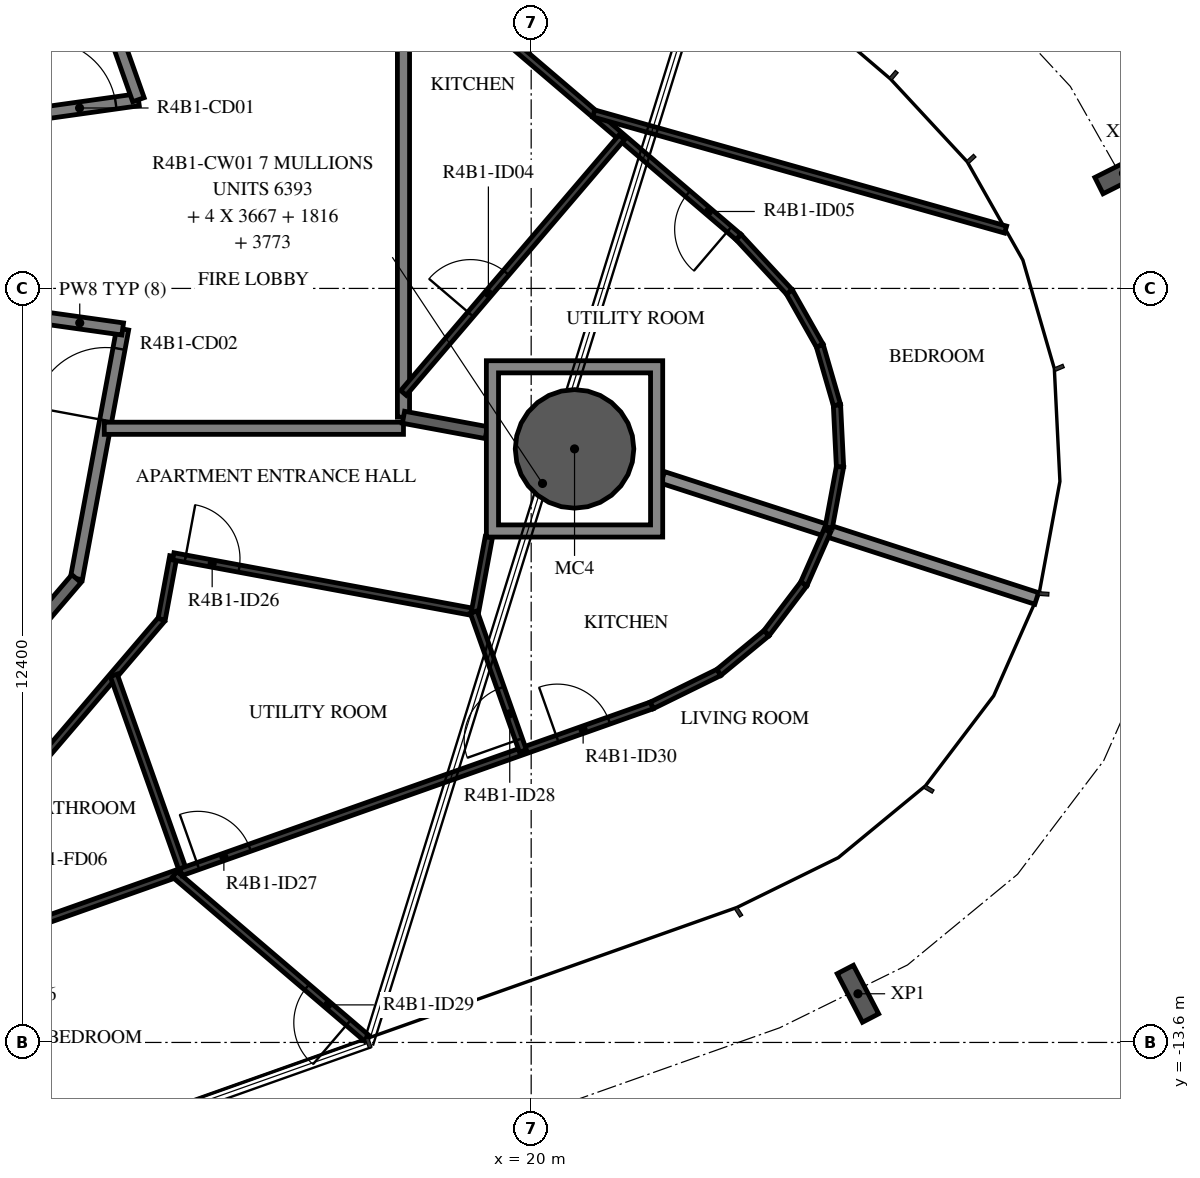
"""IFC4 building model, lengths in metres.
Left out: names, types, materials, properties, quantities, classifications, styles, units other than length and angle.
Written with IfcOpenShell. Run it as: python <this file> out.ifc"""

import sys

from ifc_helpers import new_model, si_unit, direction, frame, frame_2d, origin, origin_2d, place, context, subcontext, project, spatial, polyline, rectangle, hollow_circle, i_section, outline, extrude, element, fill, save


model = new_model("IFC4")
c1 = context("Model", 3, precision=1e-05, world=origin(), true_north=direction((0.0, 1.0)))
c2 = subcontext(c1, "Body", "Model", "MODEL_VIEW")
j1 = project(units=[si_unit("LENGTHUNIT", "METRE"), si_unit("PLANEANGLEUNIT", "RADIAN")], contexts=[c1])
p1 = place(None, origin())
s1 = spatial("IfcSite", under=j1, at=p1, CompositionType="ELEMENT")
p2 = place(p1, origin())
s2 = spatial("IfcBuilding", under=s1, at=p2, CompositionType="ELEMENT")
p3 = place(p2, frame((0.0, 0.0, 162.2)))
s3 = spatial("IfcBuildingStorey", under=s2, at=p3, CompositionType="ELEMENT", Elevation=162.2)
p4 = place(p3, frame((20.713, -3.839, -0.38), z_axis=(0.0, 0.0, 1.0), x_axis=(1.0, 0.0, 0.0)))
e1 = element("IfcColumn", 1, at=p4, inside=s3, PredefinedType="COLUMN", context=c2, shape_type="SweptSolid", body=[
    extrude(hollow_circle(Radius=0.975, WallThickness=0.045, at=origin_2d()), origin(), (0.0, 0.0, 1.0), 3.5),
])
for number, where, z_axis, x_axis in (
    (2, (25.374, -12.799, -0.38), (0.0, 0.0, 1.0), (-0.887, -0.461, 0.0)),
    (3, (29.74, 0.692, -0.38), (0.0, 0.0, 1.0), (0.449, -0.894, 0.0)),
):
    element("IfcColumn", number, at=place(p3, frame(where, z_axis=z_axis, x_axis=x_axis)), inside=s3, PredefinedType="COLUMN", context=c2, shape_type="SweptSolid", body=[
        extrude(i_section(OverallWidth=0.3, OverallDepth=0.9, WebThickness=0.019, FlangeThickness=0.035, FilletRadius=0.03, at=origin_2d()), origin(), (0.0, 0.0, 1.0), 3.5),
    ])
p5 = place(p3, frame((11.87, 1.668, 0.0), z_axis=(0.0, 0.0, 1.0), x_axis=(0.990270910415, 0.139152879904, 0.0)))
e4 = element("IfcWall", 4, at=p5, inside=s3, PredefinedType="STANDARD", context=c2, shape_type="SweptSolid", body=[
    extrude(rectangle(XDim=1.688, YDim=0.2, at=frame_2d((0.844, 0.0))), origin(), (0.0, 0.0, 1.0), 3.12),
])
p6 = place(p5, frame((0.11, 0.0, 0.0)))
e5 = element("IfcOpeningElement", 5, at=p6, cuts=e4, PredefinedType="OPENING", context=c2, shape_type="SweptSolid", body=[
    extrude(rectangle(XDim=1.2, YDim=2.1, at=frame_2d((0.6, 1.05))), frame((0.0, 0.11, 0.0), z_axis=(0.0, -1.0, 0.0), x_axis=(1.0, 0.0, 0.0)), (0.0, 0.0, 1.0), 0.22),
])
p7 = place(p3, frame((13.542, 1.903, 0.0), z_axis=(0.0, 0.0, 1.0), x_axis=(-0.333808508206, 0.942640907159, 0.0)))
e6 = element("IfcWall", 6, at=p7, inside=s3, PredefinedType="STANDARD", context=c2, shape_type="SweptSolid", body=[
    extrude(rectangle(XDim=6.317, YDim=0.2, at=frame_2d((3.158, 0.0))), origin(), (0.0, 0.0, 1.0), 3.12),
])
p8 = place(p3, frame((12.521, -5.972, 0.0), z_axis=(0.0, 0.0, 1.0), x_axis=(0.182244189886, 0.983253301674, 0.0)))
e7 = element("IfcWall", 7, at=p8, inside=s3, PredefinedType="STANDARD", context=c2, shape_type="SweptSolid", body=[
    extrude(rectangle(XDim=4.176, YDim=0.2, at=frame_2d((2.088, 0.0))), origin(), (0.0, 0.0, 1.0), 3.12),
])
p9 = place(p8, frame((2.645, 0.0, 0.0)))
e8 = element("IfcOpeningElement", 8, at=p9, cuts=e7, PredefinedType="OPENING", context=c2, shape_type="SweptSolid", body=[
    extrude(rectangle(XDim=1.2, YDim=2.1, at=frame_2d((0.6, 1.05))), frame((0.0, 0.11, 0.0), z_axis=(0.0, -1.0, 0.0), x_axis=(1.0, 0.0, 0.0)), (0.0, 0.0, 1.0), 0.22),
])
p10 = place(p3, frame((13.282, -1.867, 0.0), z_axis=(0.0, 0.0, 1.0), x_axis=(-0.990265430288, 0.139191873241, 0.0)))
e9 = element("IfcWall", 9, at=p10, inside=s3, PredefinedType="STANDARD", context=c2, shape_type="SweptSolid", body=[
    extrude(rectangle(XDim=1.426, YDim=0.2, at=frame_2d((0.713, 0.0))), origin(), (0.0, 0.0, 1.0), 3.12),
])
p11 = place(p3, frame((7.858, -11.433, 0.0), z_axis=(0.0, 0.0, 1.0), x_axis=(0.649440801937, 0.760412154545, 0.0)))
e10 = element("IfcWall", 10, at=p11, inside=s3, PredefinedType="STANDARD", context=c2, shape_type="SweptSolid", body=[
    extrude(rectangle(XDim=7.181, YDim=0.2, at=frame_2d((3.59, 0.0))), origin(), (0.0, 0.0, 1.0), 3.12),
])
p12 = place(p11, frame((0.592, 0.0, 0.0)))
e11 = element("IfcOpeningElement", 11, at=p12, cuts=e10, PredefinedType="OPENING", context=c2, shape_type="SweptSolid", body=[
    extrude(rectangle(XDim=1.0, YDim=2.1, at=frame_2d((0.5, 1.05))), frame((0.0, 0.11, 0.0), z_axis=(0.0, -1.0, 0.0), x_axis=(1.0, 0.0, 0.0)), (0.0, 0.0, 1.0), 0.22),
])
p13 = place(p3, frame((17.9, -3.318, 0.0), z_axis=(0.0, 0.0, 1.0), x_axis=(0.0, 1.0, 0.0)))
e12 = element("IfcWall", 12, at=p13, inside=s3, PredefinedType="STANDARD", context=c2, shape_type="SweptSolid", body=[
    extrude(rectangle(XDim=6.818, YDim=0.2, at=frame_2d((3.409, 0.0))), origin(), (0.0, 0.0, 1.0), 3.12),
])
p14 = place(p3, frame((12.979, -3.5, 0.0), z_axis=(0.0, 0.0, 1.0), x_axis=(1.0, 0.0, 0.0)))
e13 = element("IfcWall", 13, at=p14, inside=s3, PredefinedType="STANDARD", context=c2, shape_type="SweptSolid", body=[
    extrude(rectangle(XDim=4.92, YDim=0.2, at=frame_2d((2.46, 0.0))), origin(), (0.0, 0.0, 1.0), 3.12),
])
p15 = place(p3, frame((17.9, -3.319, 0.0), z_axis=(0.0, 0.0, 1.0), x_axis=(0.983246950753, -0.182278451375, 0.0)))
e14 = element("IfcWall", 14, at=p15, inside=s3, PredefinedType="STANDARD", context=c2, shape_type="SweptSolid", body=[
    extrude(rectangle(XDim=1.386, YDim=0.2, at=frame_2d((0.693, 0.0))), origin(), (0.0, 0.0, 1.0), 3.12),
])
p16 = place(p3, frame((22.163, -4.308, 0.0), z_axis=(0.0, 0.0, 1.0), x_axis=(0.951422718769, -0.307887658426, 0.0)))
e15 = element("IfcWall", 15, at=p16, inside=s3, PredefinedType="STANDARD", context=c2, shape_type="SweptSolid", body=[
    extrude(rectangle(XDim=6.464, YDim=0.2, at=frame_2d((3.232, 0.0))), origin(), (0.0, 0.0, 1.0), 2.73),
])
p17 = place(p3, frame((23.411, -0.357, 0.0), z_axis=(0.0, 0.0, 1.0), x_axis=(-0.76041871148, 0.649433124525, 0.0)))
e16 = element("IfcWall", 16, at=p17, inside=s3, PredefinedType="PARTITIONING", context=c2, shape_type="SweptSolid", body=[
    extrude(rectangle(XDim=9.259, YDim=0.12, at=frame_2d((4.629, 0.0))), origin(), (0.0, 0.0, 1.0), 3.12),
])
p18 = place(p17, frame((6.972, 0.0, 0.0)))
e17 = element("IfcOpeningElement", 17, at=p18, cuts=e16, PredefinedType="OPENING", context=c2, shape_type="SweptSolid", body=[
    extrude(rectangle(XDim=0.9, YDim=2.1, at=frame_2d((0.45, 1.05))), frame((0.0, 0.07, 0.0), z_axis=(0.0, -1.0, 0.0), x_axis=(1.0, 0.0, 0.0)), (0.0, 0.0, 1.0), 0.14),
])
p19 = place(p17, frame((0.2, 0.0, 0.0)))
e18 = element("IfcOpeningElement", 18, at=p19, cuts=e16, PredefinedType="OPENING", context=c2, shape_type="SweptSolid", body=[
    extrude(rectangle(XDim=0.9, YDim=2.1, at=frame_2d((0.45, 1.05))), frame((0.0, 0.07, 0.0), z_axis=(0.0, -1.0, 0.0), x_axis=(1.0, 0.0, 0.0)), (0.0, 0.0, 1.0), 0.14),
])
p20 = place(p3, frame((17.9, -2.918, 0.0), z_axis=(0.0, 0.0, 1.0), x_axis=(0.649469887983, 0.760387312232, 0.0)))
e19 = element("IfcWall", 19, at=p20, inside=s3, PredefinedType="PARTITIONING", context=c2, shape_type="SweptSolid", body=[
    extrude(rectangle(XDim=5.527, YDim=0.12, at=frame_2d((2.763, 0.0))), origin(), (0.0, 0.0, 1.0), 3.12),
])
p21 = place(p20, frame((1.7, 0.0, 0.0)))
e20 = element("IfcOpeningElement", 20, at=p21, cuts=e19, PredefinedType="OPENING", context=c2, shape_type="SweptSolid", body=[
    extrude(rectangle(XDim=0.9, YDim=2.1, at=frame_2d((0.45, 1.05))), frame((0.0, 0.07, 0.0), z_axis=(0.0, -1.0, 0.0), x_axis=(1.0, 0.0, 0.0)), (0.0, 0.0, 1.0), 0.14),
])
p22 = place(p3, frame((21.029, 1.677, 0.0), z_axis=(0.0, 0.0, 1.0), x_axis=(0.962458274539, -0.271429677396, 0.0)))
e21 = element("IfcWall", 21, at=p22, inside=s3, PredefinedType="PARTITIONING", context=c2, shape_type="SweptSolid", body=[
    extrude(rectangle(XDim=7.037, YDim=0.12, at=frame_2d((3.519, 0.0))), origin(), (0.0, 0.0, 1.0), 3.12),
])
for number, where, z_axis, x_axis in (
    (22, (24.894, -5.131, 0.0), (0.0, 0.0, 1.0), (0.182, 0.983, 0.0)),
    (23, (25.079, -4.132, 0.0), (0.0, 0.0, 1.0), (-0.049, 0.999, 0.0)),
):
    element("IfcWall", number, at=place(p3, frame(where, z_axis=z_axis, x_axis=x_axis)), inside=s3, PredefinedType="PARTITIONING", context=c2, shape_type="SweptSolid", body=[
        extrude(rectangle(XDim=1.016, YDim=0.12, at=frame_2d((0.508, 0.0))), origin(), (0.0, 0.0, 1.0), 3.12),
    ])
for number, where, z_axis, x_axis in (
    (24, (25.029, -3.117, 0.0), (0.0, 0.0, 1.0), (-0.279, 0.96, 0.0)),
    (25, (24.746, -2.141, 0.0), (0.0, 0.0, 1.0), (-0.492, 0.87, 0.0)),
):
    element("IfcWall", number, at=place(p3, frame(where, z_axis=z_axis, x_axis=x_axis)), inside=s3, PredefinedType="PARTITIONING", context=c2, shape_type="SweptSolid", body=[
        extrude(rectangle(XDim=1.016, YDim=0.12, at=frame_2d((0.508, 0.0))), origin(), (0.0, 0.0, 1.0), 3.12),
    ])
p23 = place(p3, frame((24.246, -1.257, 0.0), z_axis=(0.0, 0.0, 1.0), x_axis=(-0.679840361176, 0.733360132074, 0.0)))
e26 = element("IfcWall", 26, at=p23, inside=s3, PredefinedType="PARTITIONING", context=c2, shape_type="SweptSolid", body=[
    extrude(rectangle(XDim=1.227, YDim=0.12, at=frame_2d((0.614, 0.0))), origin(), (0.0, 0.0, 1.0), 3.12),
])
p24 = place(p3, frame((8.737, -12.713, 0.0), z_axis=(0.0, 0.0, 1.0), x_axis=(0.649430604754, 0.760420863476, 0.0)))
e27 = element("IfcWall", 27, at=p24, inside=s3, PredefinedType="PARTITIONING", context=c2, shape_type="SweptSolid", body=[
    extrude(rectangle(XDim=7.985, YDim=0.12, at=frame_2d((3.992, 0.0))), origin(), (0.0, 0.0, 1.0), 3.12),
])
p25 = place(p24, frame((1.4, 0.0, 0.0)))
e28 = element("IfcOpeningElement", 28, at=p25, cuts=e27, PredefinedType="OPENING", context=c2, shape_type="SweptSolid", body=[
    extrude(rectangle(XDim=0.8, YDim=2.1, at=frame_2d((0.4, 1.05))), frame((0.0, 0.07, 0.0), z_axis=(0.0, -1.0, 0.0), x_axis=(1.0, 0.0, 0.0)), (0.0, 0.0, 1.0), 0.14),
])
p26 = place(p3, frame((13.923, -6.641, 0.0), z_axis=(0.0, 0.0, 1.0), x_axis=(0.182396711264, 0.983225019881, 0.0)))
e29 = element("IfcWall", 29, at=p26, inside=s3, PredefinedType="PARTITIONING", context=c2, shape_type="SweptSolid", body=[
    extrude(rectangle(XDim=1.052, YDim=0.12, at=frame_2d((0.526, 0.0))), origin(), (0.0, 0.0, 1.0), 3.12),
])
p27 = place(p3, frame((14.115, -5.606, 0.0), z_axis=(0.0, 0.0, 1.0), x_axis=(0.983252350103, -0.182249323775, 0.0)))
e30 = element("IfcWall", 30, at=p27, inside=s3, PredefinedType="PARTITIONING", context=c2, shape_type="SweptSolid", body=[
    extrude(rectangle(XDim=5.025, YDim=0.12, at=frame_2d((2.512, 0.0))), origin(), (0.0, 0.0, 1.0), 3.12),
])
p28 = place(p27, frame((0.2, 0.0, 0.0)))
e31 = element("IfcOpeningElement", 31, at=p28, cuts=e30, PredefinedType="OPENING", context=c2, shape_type="SweptSolid", body=[
    extrude(rectangle(XDim=0.9, YDim=2.1, at=frame_2d((0.45, 1.05))), frame((0.0, 0.07, 0.0), z_axis=(0.0, -1.0, 0.0), x_axis=(1.0, 0.0, 0.0)), (0.0, 0.0, 1.0), 0.14),
])
p29 = place(p3, frame((19.075, -6.526, 0.0), z_axis=(0.0, 0.0, 1.0), x_axis=(0.182283897093, 0.983245941187, 0.0)))
e32 = element("IfcWall", 32, at=p29, inside=s3, PredefinedType="PARTITIONING", context=c2, shape_type="SweptSolid", body=[
    extrude(rectangle(XDim=1.258, YDim=0.12, at=frame_2d((0.629, 0.0))), origin(), (0.0, 0.0, 1.0), 3.12),
])
p30 = place(p3, frame((14.183, -10.819, 0.0), z_axis=(0.0, 0.0, 1.0), x_axis=(-0.942646448855, -0.333792858612, 0.0)))
e33 = element("IfcWall", 33, at=p30, inside=s3, PredefinedType="PARTITIONING", context=c2, shape_type="SweptSolid", body=[
    extrude(rectangle(XDim=5.828, YDim=0.12, at=frame_2d((2.914, 0.0))), origin(), (0.0, 0.0, 1.0), 3.12),
])
p31 = place(p3, frame((17.3, -13.534, 0.0), z_axis=(0.0, 0.0, 1.0), x_axis=(-0.760428665789, 0.649421468883, 0.0)))
e34 = element("IfcWall", 34, at=p31, inside=s3, PredefinedType="PARTITIONING", context=c2, shape_type="SweptSolid", body=[
    extrude(rectangle(XDim=4.157, YDim=0.12, at=frame_2d((2.078, 0.0))), origin(), (0.0, 0.0, 1.0), 3.12),
])
p32 = place(p31, frame((0.4, 0.0, 0.0)))
e35 = element("IfcOpeningElement", 35, at=p32, cuts=e34, PredefinedType="OPENING", context=c2, shape_type="SweptSolid", body=[
    extrude(rectangle(XDim=0.9, YDim=2.1, at=frame_2d((0.45, 1.05))), frame((0.0, 0.07, 0.0), z_axis=(0.0, -1.0, 0.0), x_axis=(1.0, 0.0, 0.0)), (0.0, 0.0, 1.0), 0.14),
])
p33 = place(p3, frame((14.277, -10.786, 0.0), z_axis=(0.0, 0.0, 1.0), x_axis=(-0.333865646111, 0.942620671504, 0.0)))
e36 = element("IfcWall", 36, at=p33, inside=s3, PredefinedType="PARTITIONING", context=c2, shape_type="SweptSolid", body=[
    extrude(rectangle(XDim=3.419, YDim=0.12, at=frame_2d((1.71, 0.0))), origin(), (0.0, 0.0, 1.0), 3.12),
])
p34 = place(p3, frame((14.239, -10.799, 0.0), z_axis=(0.0, 0.0, 1.0), x_axis=(0.94264202959, 0.333805338558, 0.0)))
e37 = element("IfcWall", 37, at=p34, inside=s3, PredefinedType="PARTITIONING", context=c2, shape_type="SweptSolid", body=[
    extrude(rectangle(XDim=8.216, YDim=0.12, at=frame_2d((4.108, 0.0))), origin(), (0.0, 0.0, 1.0), 3.12),
])
p35 = place(p34, frame((0.3, 0.0, 0.0)))
e38 = element("IfcOpeningElement", 38, at=p35, cuts=e37, PredefinedType="OPENING", context=c2, shape_type="SweptSolid", body=[
    extrude(rectangle(XDim=0.9, YDim=2.1, at=frame_2d((0.45, 1.05))), frame((0.0, 0.07, 0.0), z_axis=(0.0, -1.0, 0.0), x_axis=(1.0, 0.0, 0.0)), (0.0, 0.0, 1.0), 0.14),
])
p36 = place(p34, frame((6.568, 0.0, 0.0)))
e39 = element("IfcOpeningElement", 39, at=p36, cuts=e37, PredefinedType="OPENING", context=c2, shape_type="SweptSolid", body=[
    extrude(rectangle(XDim=0.9, YDim=2.1, at=frame_2d((0.45, 1.05))), frame((0.0, 0.07, 0.0), z_axis=(0.0, -1.0, 0.0), x_axis=(1.0, 0.0, 0.0)), (0.0, 0.0, 1.0), 0.14),
])
p37 = place(p3, frame((19.865, -8.807, 0.0), z_axis=(0.0, 0.0, 1.0), x_axis=(-0.33378934261, 0.942647693871, 0.0)))
e40 = element("IfcWall", 40, at=p37, inside=s3, PredefinedType="PARTITIONING", context=c2, shape_type="SweptSolid", body=[
    extrude(rectangle(XDim=2.424, YDim=0.12, at=frame_2d((1.212, 0.0))), origin(), (0.0, 0.0, 1.0), 3.12),
])
p38 = place(p37, frame((0.2, 0.0, 0.0)))
e41 = element("IfcOpeningElement", 41, at=p38, cuts=e40, PredefinedType="OPENING", context=c2, shape_type="SweptSolid", body=[
    extrude(rectangle(XDim=0.9, YDim=2.1, at=frame_2d((0.45, 1.05))), frame((0.0, 0.07, 0.0), z_axis=(0.0, -1.0, 0.0), x_axis=(1.0, 0.0, 0.0)), (0.0, 0.0, 1.0), 0.14),
])
p39 = place(p3, frame((24.87, -5.184, 0.0), z_axis=(0.0, 0.0, 1.0), x_axis=(-0.404173771344, -0.914682219439, 0.0)))
e42 = element("IfcWall", 42, at=p39, inside=s3, PredefinedType="PARTITIONING", context=c2, shape_type="SweptSolid", body=[
    extrude(rectangle(XDim=0.958, YDim=0.12, at=frame_2d((0.479, 0.0))), origin(), (0.0, 0.0, 1.0), 3.12),
])
for number, where, z_axis, x_axis in (
    (43, (24.483, -6.06, 0.0), (0.0, 0.0, 1.0), (-0.604, -0.797, 0.0)),
    (44, (23.869, -6.869, 0.0), (0.0, 0.0, 1.0), (-0.772, -0.636, 0.0)),
):
    element("IfcWall", number, at=place(p3, frame(where, z_axis=z_axis, x_axis=x_axis)), inside=s3, PredefinedType="PARTITIONING", context=c2, shape_type="SweptSolid", body=[
        extrude(rectangle(XDim=1.016, YDim=0.12, at=frame_2d((0.508, 0.0))), origin(), (0.0, 0.0, 1.0), 3.12),
    ])
p40 = place(p3, frame((23.085, -7.515, 0.0), z_axis=(0.0, 0.0, 1.0), x_axis=(-0.897431337015, -0.441154162786, 0.0)))
e45 = element("IfcWall", 45, at=p40, inside=s3, PredefinedType="PARTITIONING", context=c2, shape_type="SweptSolid", body=[
    extrude(rectangle(XDim=1.227, YDim=0.12, at=frame_2d((0.613, 0.0))), origin(), (0.0, 0.0, 1.0), 3.12),
])
p41 = place(p3, origin())
e46 = element("IfcWall", 46, at=p41, inside=s3, PredefinedType="STANDARD", context=c2, shape_type="SweptSolid", body=[
    extrude(outline(polyline([(22.163, -2.389), (22.163, -5.289), (19.263, -5.289), (19.263, -2.389), (22.163, -2.389)]), holes=[polyline([(19.463, -5.089), (21.963, -5.089), (21.963, -2.589), (19.463, -2.589), (19.463, -5.089)])]), origin(), (0.0, 0.0, 1.0), 3.12),
])
p42 = place(p21, origin())
e47 = element("IfcDoor", 47, at=p42, inside=s3, OperationType="SINGLE_SWING_LEFT", PredefinedType="DOOR", context=c2, shape_type="SweptSolid", body=[
    extrude(rectangle(XDim=0.9, YDim=2.1, at=frame_2d((0.45, 1.05))), frame((0.0, 0.025, 0.0), z_axis=(0.0, -1.0, 0.0), x_axis=(1.0, 0.0, 0.0)), (0.0, 0.0, 1.0), 0.05),
])
fill(e20, e47)
p43 = place(p19, origin())
e48 = element("IfcDoor", 48, at=p43, inside=s3, OperationType="SINGLE_SWING_LEFT", PredefinedType="DOOR", context=c2, shape_type="SweptSolid", body=[
    extrude(rectangle(XDim=0.9, YDim=2.1, at=frame_2d((0.45, 1.05))), frame((0.0, 0.025, 0.0), z_axis=(0.0, -1.0, 0.0), x_axis=(1.0, 0.0, 0.0)), (0.0, 0.0, 1.0), 0.05),
])
fill(e18, e48)
p44 = place(p28, origin())
e49 = element("IfcDoor", 49, at=p44, inside=s3, OperationType="SINGLE_SWING_RIGHT", PredefinedType="DOOR", context=c2, shape_type="SweptSolid", body=[
    extrude(rectangle(XDim=0.9, YDim=2.1, at=frame_2d((0.45, 1.05))), frame((0.0, 0.025, 0.0), z_axis=(0.0, -1.0, 0.0), x_axis=(1.0, 0.0, 0.0)), (0.0, 0.0, 1.0), 0.05),
])
fill(e31, e49)
p45 = place(p35, origin())
e50 = element("IfcDoor", 50, at=p45, inside=s3, OperationType="SINGLE_SWING_RIGHT", PredefinedType="DOOR", context=c2, shape_type="SweptSolid", body=[
    extrude(rectangle(XDim=0.9, YDim=2.1, at=frame_2d((0.45, 1.05))), frame((0.0, 0.025, 0.0), z_axis=(0.0, -1.0, 0.0), x_axis=(1.0, 0.0, 0.0)), (0.0, 0.0, 1.0), 0.05),
])
fill(e38, e50)
p46 = place(p38, origin())
e51 = element("IfcDoor", 51, at=p46, inside=s3, OperationType="SINGLE_SWING_RIGHT", PredefinedType="DOOR", context=c2, shape_type="SweptSolid", body=[
    extrude(rectangle(XDim=0.9, YDim=2.1, at=frame_2d((0.45, 1.05))), frame((0.0, 0.025, 0.0), z_axis=(0.0, -1.0, 0.0), x_axis=(1.0, 0.0, 0.0)), (0.0, 0.0, 1.0), 0.05),
])
fill(e41, e51)
p47 = place(p32, origin())
e52 = element("IfcDoor", 52, at=p47, inside=s3, OperationType="SINGLE_SWING_LEFT", PredefinedType="DOOR", context=c2, shape_type="SweptSolid", body=[
    extrude(rectangle(XDim=0.9, YDim=2.1, at=frame_2d((0.45, 1.05))), frame((0.0, 0.025, 0.0), z_axis=(0.0, -1.0, 0.0), x_axis=(1.0, 0.0, 0.0)), (0.0, 0.0, 1.0), 0.05),
])
fill(e35, e52)
p48 = place(p36, origin())
e53 = element("IfcDoor", 53, at=p48, inside=s3, OperationType="SINGLE_SWING_LEFT", PredefinedType="DOOR", context=c2, shape_type="SweptSolid", body=[
    extrude(rectangle(XDim=0.9, YDim=2.1, at=frame_2d((0.45, 1.05))), frame((0.0, 0.025, 0.0), z_axis=(0.0, -1.0, 0.0), x_axis=(1.0, 0.0, 0.0)), (0.0, 0.0, 1.0), 0.05),
])
fill(e39, e53)
p49 = place(p6, origin())
e54 = element("IfcDoor", 54, at=p49, inside=s3, OperationType="DOUBLE_DOOR_SINGLE_SWING", PredefinedType="DOOR", context=c2, shape_type="SweptSolid", body=[
    extrude(rectangle(XDim=1.2, YDim=2.1, at=frame_2d((0.6, 1.05))), frame((0.0, 0.025, 0.0), z_axis=(0.0, -1.0, 0.0), x_axis=(1.0, 0.0, 0.0)), (0.0, 0.0, 1.0), 0.05),
])
fill(e5, e54)
p50 = place(p9, origin())
e55 = element("IfcDoor", 55, at=p50, inside=s3, OperationType="DOUBLE_DOOR_SINGLE_SWING", PredefinedType="DOOR", context=c2, shape_type="SweptSolid", body=[
    extrude(rectangle(XDim=1.2, YDim=2.1, at=frame_2d((0.6, 1.05))), frame((0.0, 0.025, 0.0), z_axis=(0.0, -1.0, 0.0), x_axis=(1.0, 0.0, 0.0)), (0.0, 0.0, 1.0), 0.05),
])
fill(e8, e55)
save(model, sys.argv[1])
